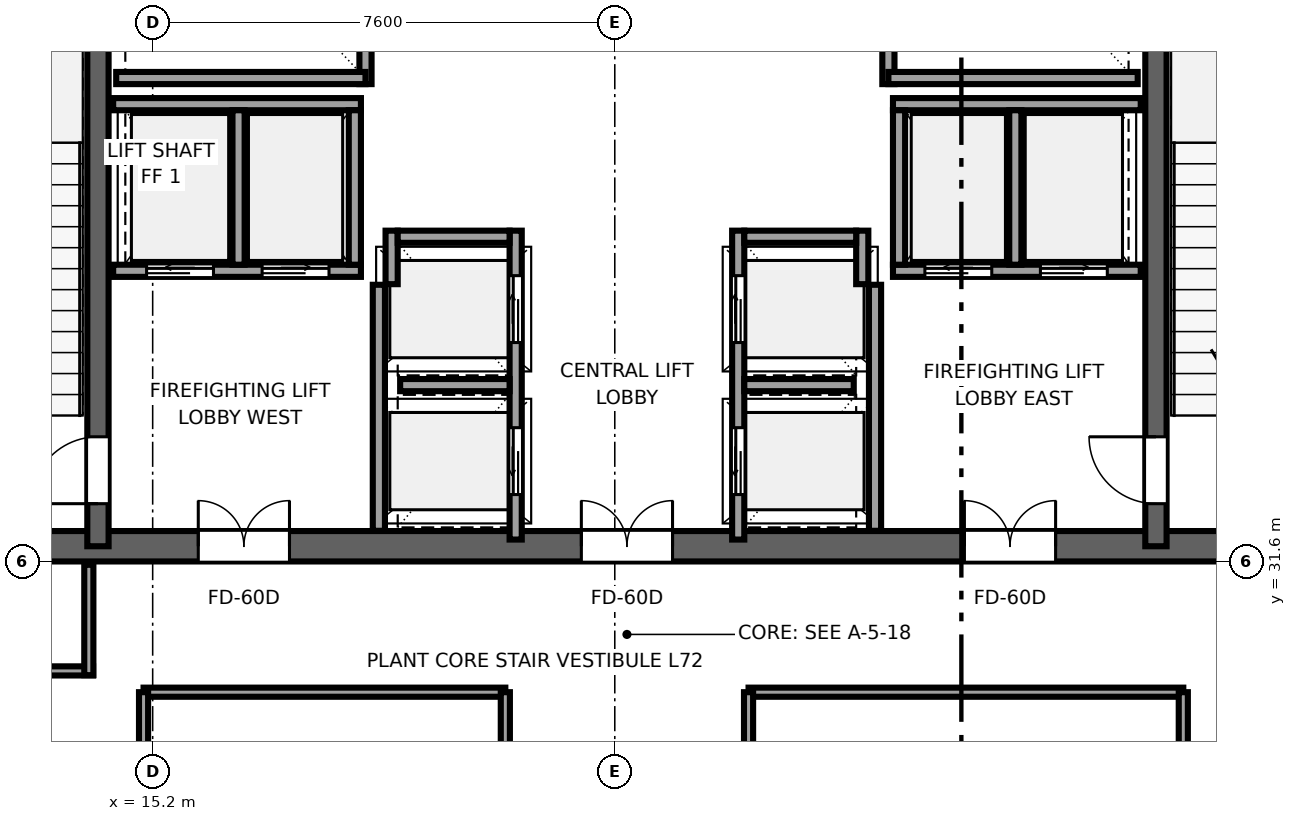
"""IFC4 building model, lengths in metres.
Left out: names, types, materials, properties, quantities, classifications, styles, units other than length and angle.
Written with IfcOpenShell. Run it as: python <this file> out.ifc"""

import sys

from ifc_helpers import new_model, si_unit, direction, frame, frame_2d, origin, place, context, subcontext, project, spatial, rectangle, extrude, source, transform, mapped, element, fill, save


model = new_model("IFC4")
c1 = context("Model", 3, precision=1e-05, world=origin(), true_north=direction((0.0, 1.0)))
c2 = subcontext(c1, "Body", "Model", "MODEL_VIEW")
j1 = project(units=[si_unit("LENGTHUNIT", "METRE"), si_unit("PLANEANGLEUNIT", "RADIAN")], contexts=[c1])
p1 = place(None, origin())
s1 = spatial("IfcSite", under=j1, at=p1, CompositionType="ELEMENT")
p2 = place(p1, origin())
s2 = spatial("IfcBuilding", under=s1, at=p2, CompositionType="ELEMENT")
p3 = place(p2, frame((0.0, 0.0, 270.05)))
s3 = spatial("IfcBuildingStorey", under=s2, at=p3, CompositionType="ELEMENT", Elevation=270.05)
p4 = place(p3, frame((10.0, 31.85, 0.0), z_axis=(0.0, 0.0, 1.0), x_axis=(1.0, 0.0, 0.0)))
e1 = element("IfcWall", 1, at=p4, inside=s3, PredefinedType="SHEAR", context=c2, shape_type="SweptSolid", body=[
    extrude(rectangle(XDim=26.0, YDim=0.5, at=frame_2d((13.0, 0.0))), origin(), (0.0, 0.0, 1.0), 5.0),
])
p5 = place(p4, frame((7.45, 0.0, 0.0), z_axis=(0.0, 0.0, 1.0), x_axis=(-1.0, 0.0, 0.0)))
e2 = element("IfcOpeningElement", 2, at=p5, cuts=e1, PredefinedType="OPENING", context=c2, shape_type="SweptSolid", body=[
    extrude(rectangle(XDim=1.5, YDim=2.04, at=frame_2d((0.75, 1.02))), frame((0.0, 0.26, 0.0), z_axis=(0.0, -1.0, 0.0), x_axis=(1.0, 0.0, 0.0)), (0.0, 0.0, 1.0), 0.52),
])
p6 = place(p4, frame((13.75, 0.0, 0.0), z_axis=(0.0, 0.0, 1.0), x_axis=(-1.0, 0.0, 0.0)))
e3 = element("IfcOpeningElement", 3, at=p6, cuts=e1, PredefinedType="OPENING", context=c2, shape_type="SweptSolid", body=[
    extrude(rectangle(XDim=1.5, YDim=2.04, at=frame_2d((0.75, 1.02))), frame((0.0, 0.26, 0.0), z_axis=(0.0, -1.0, 0.0), x_axis=(1.0, 0.0, 0.0)), (0.0, 0.0, 1.0), 0.52),
])
p7 = place(p4, frame((20.05, 0.0, 0.0), z_axis=(0.0, 0.0, 1.0), x_axis=(-1.0, 0.0, 0.0)))
e4 = element("IfcOpeningElement", 4, at=p7, cuts=e1, PredefinedType="OPENING", context=c2, shape_type="SweptSolid", body=[
    extrude(rectangle(XDim=1.5, YDim=2.04, at=frame_2d((0.75, 1.02))), frame((0.0, 0.26, 0.0), z_axis=(0.0, -1.0, 0.0), x_axis=(1.0, 0.0, 0.0)), (0.0, 0.0, 1.0), 0.52),
])
p8 = place(p3, frame((14.3, 31.85, 0.0), z_axis=(0.0, 0.0, 1.0), x_axis=(0.0, 1.0, 0.0)))
e5 = element("IfcWall", 5, at=p8, inside=s3, PredefinedType="SHEAR", context=c2, shape_type="SweptSolid", body=[
    extrude(rectangle(XDim=13.1, YDim=0.35, at=frame_2d((6.55, 0.0))), origin(), (0.0, 0.0, 1.0), 5.0),
])
p9 = place(p8, frame((0.7, 0.0, 0.0)))
e6 = element("IfcOpeningElement", 6, at=p9, cuts=e5, PredefinedType="OPENING", context=c2, shape_type="SweptSolid", body=[
    extrude(rectangle(XDim=1.1, YDim=2.12, at=frame_2d((0.55, 1.06))), frame((0.0, 0.185, 0.0), z_axis=(0.0, -1.0, 0.0), x_axis=(1.0, 0.0, 0.0)), (0.0, 0.0, 1.0), 0.37),
])
p10 = place(p3, frame((31.7, 31.85, 0.0), z_axis=(0.0, 0.0, 1.0), x_axis=(0.0, 1.0, 0.0)))
e7 = element("IfcWall", 7, at=p10, inside=s3, PredefinedType="SHEAR", context=c2, shape_type="SweptSolid", body=[
    extrude(rectangle(XDim=13.1, YDim=0.35, at=frame_2d((6.55, 0.0))), origin(), (0.0, 0.0, 1.0), 5.0),
])
p11 = place(p10, frame((1.8, 0.0, 0.0), z_axis=(0.0, 0.0, 1.0), x_axis=(-1.0, 0.0, 0.0)))
e8 = element("IfcOpeningElement", 8, at=p11, cuts=e7, PredefinedType="OPENING", context=c2, shape_type="SweptSolid", body=[
    extrude(rectangle(XDim=1.1, YDim=2.12, at=frame_2d((0.55, 1.06))), frame((0.0, 0.185, 0.0), z_axis=(0.0, -1.0, 0.0), x_axis=(1.0, 0.0, 0.0)), (0.0, 0.0, 1.0), 0.37),
])
p12 = place(p3, frame((18.7, 39.45, 0.0), z_axis=(0.0, 0.0, 1.0), x_axis=(0.0, 1.0, 0.0)))
e9 = element("IfcWall", 9, at=p12, inside=s3, PredefinedType="SOLIDWALL", context=c2, shape_type="SweptSolid", body=[
    extrude(rectangle(XDim=4.4, YDim=0.2, at=frame_2d((2.2, 0.0))), origin(), (0.0, 0.0, 1.0), 4.78),
])
p13 = place(p3, frame((14.6, 39.55, 0.0), z_axis=(0.0, 0.0, 1.0), x_axis=(1.0, 0.0, 0.0)))
e10 = element("IfcWall", 10, at=p13, inside=s3, PredefinedType="SOLIDWALL", context=c2, shape_type="SweptSolid", body=[
    extrude(rectangle(XDim=4.1, YDim=0.2, at=frame_2d((2.05, 0.0))), origin(), (0.0, 0.0, 1.0), 4.78),
])
p14 = place(p3, frame((27.3, 39.45, 0.0), z_axis=(0.0, 0.0, 1.0), x_axis=(0.0, 1.0, 0.0)))
e11 = element("IfcWall", 11, at=p14, inside=s3, PredefinedType="SOLIDWALL", context=c2, shape_type="SweptSolid", body=[
    extrude(rectangle(XDim=4.4, YDim=0.2, at=frame_2d((2.2, 0.0))), origin(), (0.0, 0.0, 1.0), 4.78),
])
p15 = place(p3, frame((27.3, 39.55, 0.0), z_axis=(0.0, 0.0, 1.0), x_axis=(1.0, 0.0, 0.0)))
e12 = element("IfcWall", 12, at=p15, inside=s3, PredefinedType="SOLIDWALL", context=c2, shape_type="SweptSolid", body=[
    extrude(rectangle(XDim=4.1, YDim=0.2, at=frame_2d((2.05, 0.0))), origin(), (0.0, 0.0, 1.0), 4.78),
])
for number, where, z_axis, x_axis in (
    (13, (18.92, 32.104, 0.0), (0.0, 0.0, 1.0), (0.0, 1.0, 0.0)),
    (14, (27.08, 32.104, 0.0), (0.0, 0.0, 1.0), (0.0, 1.0, 0.0)),
):
    element("IfcWall", number, at=place(p3, frame(where, z_axis=z_axis, x_axis=x_axis)), inside=s3, PredefinedType="SOLIDWALL", context=c2, shape_type="SweptSolid", body=[
        extrude(rectangle(XDim=4.046, YDim=0.2, at=frame_2d((2.023, 0.0))), origin(), (0.0, 0.0, 1.0), 4.78),
    ])
p16 = place(p3, frame((21.17, 31.96, 0.0), z_axis=(0.0, 0.0, 1.0), x_axis=(0.0, 1.0, 0.0)))
e15 = element("IfcWall", 15, at=p16, inside=s3, PredefinedType="SOLIDWALL", context=c2, shape_type="SweptSolid", body=[
    extrude(rectangle(XDim=5.08, YDim=0.2, at=frame_2d((2.54, 0.0))), origin(), (0.0, 0.0, 1.0), 4.78),
])
p17 = place(p16, frame((0.74, 0.0, 0.0)))
e16 = element("IfcOpeningElement", 16, at=p17, cuts=e15, PredefinedType="OPENING", context=c2, shape_type="SweptSolid", body=[
    extrude(rectangle(XDim=1.1, YDim=2.12, at=frame_2d((0.55, 1.06))), frame((0.0, 0.11, 0.0), z_axis=(0.0, -1.0, 0.0), x_axis=(1.0, 0.0, 0.0)), (0.0, 0.0, 1.0), 0.22),
])
p18 = place(p16, frame((3.24, 0.0, 0.0)))
e17 = element("IfcOpeningElement", 17, at=p18, cuts=e15, PredefinedType="OPENING", context=c2, shape_type="SweptSolid", body=[
    extrude(rectangle(XDim=1.1, YDim=2.12, at=frame_2d((0.55, 1.06))), frame((0.0, 0.11, 0.0), z_axis=(0.0, -1.0, 0.0), x_axis=(1.0, 0.0, 0.0)), (0.0, 0.0, 1.0), 0.22),
])
p19 = place(p3, frame((19.13, 36.16, 0.0), z_axis=(0.0, 0.0, 1.0), x_axis=(0.0, 1.0, 0.0)))
e18 = element("IfcWall", 18, at=p19, inside=s3, PredefinedType="SOLIDWALL", context=c2, shape_type="SweptSolid", body=[
    extrude(rectangle(XDim=0.88, YDim=0.2, at=frame_2d((0.44, 0.0))), origin(), (0.0, 0.0, 1.0), 4.78),
])
p20 = place(p3, frame((19.23, 36.94, 0.0), z_axis=(0.0, 0.0, 1.0), x_axis=(1.0, 0.0, 0.0)))
e19 = element("IfcWall", 19, at=p20, inside=s3, PredefinedType="SOLIDWALL", context=c2, shape_type="SweptSolid", body=[
    extrude(rectangle(XDim=1.84, YDim=0.2, at=frame_2d((0.92, 0.0))), origin(), (0.0, 0.0, 1.0), 4.78),
])
p21 = place(p3, frame((19.27, 34.5, 0.0), z_axis=(0.0, 0.0, 1.0), x_axis=(1.0, 0.0, 0.0)))
e20 = element("IfcWall", 20, at=p21, inside=s3, PredefinedType="SOLIDWALL", context=c2, shape_type="SweptSolid", body=[
    extrude(rectangle(XDim=1.8, YDim=0.2, at=frame_2d((0.9, 0.0))), origin(), (0.0, 0.0, 1.0), 4.78),
])
p22 = place(p3, frame((27.375, 36.38, 0.0), z_axis=(0.0, 0.0, 1.0), x_axis=(1.0, 0.0, 0.0)))
e21 = element("IfcWall", 21, at=p22, inside=s3, PredefinedType="SOLIDWALL", context=c2, shape_type="SweptSolid", body=[
    extrude(rectangle(XDim=4.075, YDim=0.2, at=frame_2d((2.038, 0.0))), origin(), (0.0, 0.0, 1.0), 4.78),
])
p23 = place(p22, frame((0.525, 0.0, 0.0)))
e22 = element("IfcOpeningElement", 22, at=p23, cuts=e21, PredefinedType="OPENING", context=c2, shape_type="SweptSolid", body=[
    extrude(rectangle(XDim=1.1, YDim=2.12, at=frame_2d((0.55, 1.06))), frame((0.0, 0.11, 0.0), z_axis=(0.0, -1.0, 0.0), x_axis=(1.0, 0.0, 0.0)), (0.0, 0.0, 1.0), 0.22),
])
p24 = place(p22, frame((2.425, 0.0, 0.0)))
e23 = element("IfcOpeningElement", 23, at=p24, cuts=e21, PredefinedType="OPENING", context=c2, shape_type="SweptSolid", body=[
    extrude(rectangle(XDim=1.1, YDim=2.12, at=frame_2d((0.55, 1.06))), frame((0.0, 0.11, 0.0), z_axis=(0.0, -1.0, 0.0), x_axis=(1.0, 0.0, 0.0)), (0.0, 0.0, 1.0), 0.22),
])
p25 = place(p3, frame((27.375, 39.12, 0.0), z_axis=(0.0, 0.0, 1.0), x_axis=(1.0, 0.0, 0.0)))
e24 = element("IfcWall", 24, at=p25, inside=s3, PredefinedType="SOLIDWALL", context=c2, shape_type="SweptSolid", body=[
    extrude(rectangle(XDim=4.075, YDim=0.2, at=frame_2d((2.038, 0.0))), origin(), (0.0, 0.0, 1.0), 4.78),
])
for number, where, z_axis, x_axis in (
    (25, (27.475, 36.48, 0.0), (0.0, 0.0, 1.0), (0.0, 1.0, 0.0)),
    (26, (29.387, 36.48, 0.0), (0.0, 0.0, 1.0), (0.0, 1.0, 0.0)),
):
    element("IfcWall", number, at=place(p3, frame(where, z_axis=z_axis, x_axis=x_axis)), inside=s3, PredefinedType="SOLIDWALL", context=c2, shape_type="SweptSolid", body=[
        extrude(rectangle(XDim=2.54, YDim=0.2, at=frame_2d((1.27, 0.0))), origin(), (0.0, 0.0, 1.0), 4.78),
    ])
p26 = place(p3, frame((14.55, 36.38, 0.0), z_axis=(0.0, 0.0, 1.0), x_axis=(1.0, 0.0, 0.0)))
e27 = element("IfcWall", 27, at=p26, inside=s3, PredefinedType="SOLIDWALL", context=c2, shape_type="SweptSolid", body=[
    extrude(rectangle(XDim=4.075, YDim=0.2, at=frame_2d((2.038, 0.0))), origin(), (0.0, 0.0, 1.0), 4.78),
])
p27 = place(p26, frame((0.55, 0.0, 0.0)))
e28 = element("IfcOpeningElement", 28, at=p27, cuts=e27, PredefinedType="OPENING", context=c2, shape_type="SweptSolid", body=[
    extrude(rectangle(XDim=1.1, YDim=2.12, at=frame_2d((0.55, 1.06))), frame((0.0, 0.11, 0.0), z_axis=(0.0, -1.0, 0.0), x_axis=(1.0, 0.0, 0.0)), (0.0, 0.0, 1.0), 0.22),
])
p28 = place(p26, frame((2.45, 0.0, 0.0)))
e29 = element("IfcOpeningElement", 29, at=p28, cuts=e27, PredefinedType="OPENING", context=c2, shape_type="SweptSolid", body=[
    extrude(rectangle(XDim=1.1, YDim=2.12, at=frame_2d((0.55, 1.06))), frame((0.0, 0.11, 0.0), z_axis=(0.0, -1.0, 0.0), x_axis=(1.0, 0.0, 0.0)), (0.0, 0.0, 1.0), 0.22),
])
p29 = place(p3, frame((14.55, 39.12, 0.0), z_axis=(0.0, 0.0, 1.0), x_axis=(1.0, 0.0, 0.0)))
e30 = element("IfcWall", 30, at=p29, inside=s3, PredefinedType="SOLIDWALL", context=c2, shape_type="SweptSolid", body=[
    extrude(rectangle(XDim=4.075, YDim=0.2, at=frame_2d((2.038, 0.0))), origin(), (0.0, 0.0, 1.0), 4.78),
])
for number, where, z_axis, x_axis in (
    (31, (18.525, 36.48, 0.0), (0.0, 0.0, 1.0), (0.0, 1.0, 0.0)),
    (32, (16.613, 36.48, 0.0), (0.0, 0.0, 1.0), (0.0, 1.0, 0.0)),
):
    element("IfcWall", number, at=place(p3, frame(where, z_axis=z_axis, x_axis=x_axis)), inside=s3, PredefinedType="SOLIDWALL", context=c2, shape_type="SweptSolid", body=[
        extrude(rectangle(XDim=2.54, YDim=0.2, at=frame_2d((1.27, 0.0))), origin(), (0.0, 0.0, 1.0), 4.78),
    ])
p30 = place(p3, frame((24.83, 31.96, 0.0), z_axis=(0.0, 0.0, 1.0), x_axis=(0.0, 1.0, 0.0)))
e33 = element("IfcWall", 33, at=p30, inside=s3, PredefinedType="SOLIDWALL", context=c2, shape_type="SweptSolid", body=[
    extrude(rectangle(XDim=5.08, YDim=0.2, at=frame_2d((2.54, 0.0))), origin(), (0.0, 0.0, 1.0), 4.78),
])
p31 = place(p30, frame((0.74, 0.0, 0.0)))
e34 = element("IfcOpeningElement", 34, at=p31, cuts=e33, PredefinedType="OPENING", context=c2, shape_type="SweptSolid", body=[
    extrude(rectangle(XDim=1.1, YDim=2.12, at=frame_2d((0.55, 1.06))), frame((0.0, 0.11, 0.0), z_axis=(0.0, -1.0, 0.0), x_axis=(1.0, 0.0, 0.0)), (0.0, 0.0, 1.0), 0.22),
])
p32 = place(p30, frame((3.24, 0.0, 0.0)))
e35 = element("IfcOpeningElement", 35, at=p32, cuts=e33, PredefinedType="OPENING", context=c2, shape_type="SweptSolid", body=[
    extrude(rectangle(XDim=1.1, YDim=2.12, at=frame_2d((0.55, 1.06))), frame((0.0, 0.11, 0.0), z_axis=(0.0, -1.0, 0.0), x_axis=(1.0, 0.0, 0.0)), (0.0, 0.0, 1.0), 0.22),
])
p33 = place(p3, frame((26.87, 36.16, 0.0), z_axis=(0.0, 0.0, 1.0), x_axis=(0.0, 1.0, 0.0)))
e36 = element("IfcWall", 36, at=p33, inside=s3, PredefinedType="SOLIDWALL", context=c2, shape_type="SweptSolid", body=[
    extrude(rectangle(XDim=0.88, YDim=0.2, at=frame_2d((0.44, 0.0))), origin(), (0.0, 0.0, 1.0), 4.78),
])
p34 = place(p3, frame((24.93, 36.94, 0.0), z_axis=(0.0, 0.0, 1.0), x_axis=(1.0, 0.0, 0.0)))
e37 = element("IfcWall", 37, at=p34, inside=s3, PredefinedType="SOLIDWALL", context=c2, shape_type="SweptSolid", body=[
    extrude(rectangle(XDim=1.84, YDim=0.2, at=frame_2d((0.92, 0.0))), origin(), (0.0, 0.0, 1.0), 4.78),
])
p35 = place(p3, frame((24.93, 34.5, 0.0), z_axis=(0.0, 0.0, 1.0), x_axis=(1.0, 0.0, 0.0)))
e38 = element("IfcWall", 38, at=p35, inside=s3, PredefinedType="SOLIDWALL", context=c2, shape_type="SweptSolid", body=[
    extrude(rectangle(XDim=1.8, YDim=0.2, at=frame_2d((0.9, 0.0))), origin(), (0.0, 0.0, 1.0), 4.78),
])
p36 = place(p3, frame((15.05, 29.45, 0.0), z_axis=(0.0, 0.0, 1.0), x_axis=(1.0, 0.0, 0.0)))
e39 = element("IfcWall", 39, at=p36, inside=s3, PredefinedType="PARTITIONING", context=c2, shape_type="SweptSolid", body=[
    extrude(rectangle(XDim=5.95, YDim=0.15, at=frame_2d((2.975, 0.0))), origin(), (0.0, 0.0, 1.0), 4.78),
])
for number, where, z_axis, x_axis in (
    (40, (15.05, 24.05, 0.0), (0.0, 0.0, 1.0), (0.0, 1.0, 0.0)),
    (41, (21.0, 24.05, 0.0), (0.0, 0.0, 1.0), (0.0, 1.0, 0.0)),
):
    element("IfcWall", number, at=place(p3, frame(where, z_axis=z_axis, x_axis=x_axis)), inside=s3, PredefinedType="PARTITIONING", context=c2, shape_type="SweptSolid", body=[
        extrude(rectangle(XDim=5.4, YDim=0.15, at=frame_2d((2.7, 0.0))), origin(), (0.0, 0.0, 1.0), 4.78),
    ])
p37 = place(p3, frame((25.0, 29.45, 0.0), z_axis=(0.0, 0.0, 1.0), x_axis=(1.0, 0.0, 0.0)))
e42 = element("IfcWall", 42, at=p37, inside=s3, PredefinedType="PARTITIONING", context=c2, shape_type="SweptSolid", body=[
    extrude(rectangle(XDim=7.15, YDim=0.15, at=frame_2d((3.575, 0.0))), origin(), (0.0, 0.0, 1.0), 4.78),
])
for number, where, z_axis, x_axis in (
    (43, (25.0, 24.05, 0.0), (0.0, 0.0, 1.0), (0.0, 1.0, 0.0)),
    (44, (32.15, 24.05, 0.0), (0.0, 0.0, 1.0), (0.0, 1.0, 0.0)),
):
    element("IfcWall", number, at=place(p3, frame(where, z_axis=z_axis, x_axis=x_axis)), inside=s3, PredefinedType="PARTITIONING", context=c2, shape_type="SweptSolid", body=[
        extrude(rectangle(XDim=5.4, YDim=0.15, at=frame_2d((2.7, 0.0))), origin(), (0.0, 0.0, 1.0), 4.78),
    ])
p38 = place(p3, frame((9.83, 29.8, 0.0), z_axis=(0.0, 0.0, 1.0), x_axis=(1.0, 0.0, 0.0)))
e45 = element("IfcWall", 45, at=p38, inside=s3, PredefinedType="PARTITIONING", context=c2, shape_type="SweptSolid", body=[
    extrude(rectangle(XDim=4.39, YDim=0.15, at=frame_2d((2.195, 0.0))), origin(), (0.0, 0.0, 1.0), 4.78),
])
p39 = place(p3, frame((14.15, 29.73, 0.0), z_axis=(0.0, 0.0, 1.0), x_axis=(0.0, 1.0, 0.0)))
e46 = element("IfcWall", 46, at=p39, inside=s3, PredefinedType="PARTITIONING", context=c2, shape_type="SweptSolid", body=[
    extrude(rectangle(XDim=1.815, YDim=0.15, at=frame_2d((0.907, 0.0))), origin(), (0.0, 0.0, 1.0), 3.57),
])
m1 = source(origin(), c2, "Body", "SweptSolid", [
    extrude(rectangle(XDim=1.1, YDim=2.12, at=frame_2d((0.55, 1.06))), frame((0.0, 0.025, 0.0), z_axis=(0.0, -1.0, 0.0), x_axis=(1.0, 0.0, 0.0)), (0.0, 0.0, 1.0), 0.05),
])
p40 = place(p9, origin())
e47 = element("IfcDoor", 47, at=p40, inside=s3, OperationType="SINGLE_SWING_LEFT", PredefinedType="DOOR", context=c2, shape_type="MappedRepresentation", body=[
    mapped(m1, transform((0.0, 0.0, 0.0), x_axis=(1.0, 0.0, 0.0), y_axis=(0.0, 1.0, 0.0), z_axis=(0.0, 0.0, 1.0), scale=1.0)),
])
fill(e6, e47)
p41 = place(p11, origin())
e48 = element("IfcDoor", 48, at=p41, inside=s3, OperationType="SINGLE_SWING_RIGHT", PredefinedType="DOOR", context=c2, shape_type="MappedRepresentation", body=[
    mapped(m1, transform((0.0, 0.0, 0.0), x_axis=(1.0, 0.0, 0.0), y_axis=(0.0, 1.0, 0.0), z_axis=(0.0, 0.0, 1.0), scale=1.0)),
])
fill(e8, e48)
m2 = source(origin(), c2, "Body", "SweptSolid", [
    extrude(rectangle(XDim=1.5, YDim=2.04, at=frame_2d((0.75, 1.02))), frame((0.0, 0.025, 0.0), z_axis=(0.0, -1.0, 0.0), x_axis=(1.0, 0.0, 0.0)), (0.0, 0.0, 1.0), 0.05),
])
p42 = place(p5, origin())
e49 = element("IfcDoor", 49, at=p42, inside=s3, OperationType="DOUBLE_DOOR_SINGLE_SWING", PredefinedType="DOOR", context=c2, shape_type="MappedRepresentation", body=[
    mapped(m2, transform((0.0, 0.0, 0.0), x_axis=(1.0, 0.0, 0.0), y_axis=(0.0, 1.0, 0.0), z_axis=(0.0, 0.0, 1.0), scale=1.0)),
])
fill(e2, e49)
p43 = place(p6, origin())
e50 = element("IfcDoor", 50, at=p43, inside=s3, OperationType="DOUBLE_DOOR_SINGLE_SWING", PredefinedType="DOOR", context=c2, shape_type="MappedRepresentation", body=[
    mapped(m2, transform((0.0, 0.0, 0.0), x_axis=(1.0, 0.0, 0.0), y_axis=(0.0, 1.0, 0.0), z_axis=(0.0, 0.0, 1.0), scale=1.0)),
])
fill(e3, e50)
p44 = place(p7, origin())
e51 = element("IfcDoor", 51, at=p44, inside=s3, OperationType="DOUBLE_DOOR_SINGLE_SWING", PredefinedType="DOOR", context=c2, shape_type="MappedRepresentation", body=[
    mapped(m2, transform((0.0, 0.0, 0.0), x_axis=(1.0, 0.0, 0.0), y_axis=(0.0, 1.0, 0.0), z_axis=(0.0, 0.0, 1.0), scale=1.0)),
])
fill(e4, e51)
m3 = source(origin(), c2, "Body", "SweptSolid", [
    extrude(rectangle(XDim=1.1, YDim=2.12, at=frame_2d((0.55, 1.06))), frame((0.0, 0.025, 0.0), z_axis=(0.0, -1.0, 0.0), x_axis=(1.0, 0.0, 0.0)), (0.0, 0.0, 1.0), 0.05),
])
p45 = place(p17, origin())
e52 = element("IfcDoor", 52, at=p45, inside=s3, OperationType="SLIDING_TO_LEFT", PredefinedType="DOOR", context=c2, shape_type="MappedRepresentation", body=[
    mapped(m3, transform((0.0, 0.0, 0.0), x_axis=(1.0, 0.0, 0.0), y_axis=(0.0, 1.0, 0.0), z_axis=(0.0, 0.0, 1.0), scale=1.0)),
])
fill(e16, e52)
p46 = place(p18, origin())
e53 = element("IfcDoor", 53, at=p46, inside=s3, OperationType="SLIDING_TO_RIGHT", PredefinedType="DOOR", context=c2, shape_type="MappedRepresentation", body=[
    mapped(m3, transform((0.0, 0.0, 0.0), x_axis=(1.0, 0.0, 0.0), y_axis=(0.0, 1.0, 0.0), z_axis=(0.0, 0.0, 1.0), scale=1.0)),
])
fill(e17, e53)
p47 = place(p23, origin())
e54 = element("IfcDoor", 54, at=p47, inside=s3, OperationType="SLIDING_TO_LEFT", PredefinedType="DOOR", context=c2, shape_type="MappedRepresentation", body=[
    mapped(m3, transform((0.0, 0.0, 0.0), x_axis=(1.0, 0.0, 0.0), y_axis=(0.0, 1.0, 0.0), z_axis=(0.0, 0.0, 1.0), scale=1.0)),
])
fill(e22, e54)
p48 = place(p24, origin())
e55 = element("IfcDoor", 55, at=p48, inside=s3, OperationType="SLIDING_TO_RIGHT", PredefinedType="DOOR", context=c2, shape_type="MappedRepresentation", body=[
    mapped(m3, transform((0.0, 0.0, 0.0), x_axis=(1.0, 0.0, 0.0), y_axis=(0.0, 1.0, 0.0), z_axis=(0.0, 0.0, 1.0), scale=1.0)),
])
fill(e23, e55)
p49 = place(p27, origin())
e56 = element("IfcDoor", 56, at=p49, inside=s3, OperationType="SLIDING_TO_LEFT", PredefinedType="DOOR", context=c2, shape_type="MappedRepresentation", body=[
    mapped(m3, transform((0.0, 0.0, 0.0), x_axis=(1.0, 0.0, 0.0), y_axis=(0.0, 1.0, 0.0), z_axis=(0.0, 0.0, 1.0), scale=1.0)),
])
fill(e28, e56)
p50 = place(p28, origin())
e57 = element("IfcDoor", 57, at=p50, inside=s3, OperationType="SLIDING_TO_RIGHT", PredefinedType="DOOR", context=c2, shape_type="MappedRepresentation", body=[
    mapped(m3, transform((0.0, 0.0, 0.0), x_axis=(1.0, 0.0, 0.0), y_axis=(0.0, 1.0, 0.0), z_axis=(0.0, 0.0, 1.0), scale=1.0)),
])
fill(e29, e57)
p51 = place(p31, origin())
e58 = element("IfcDoor", 58, at=p51, inside=s3, OperationType="SLIDING_TO_LEFT", PredefinedType="DOOR", context=c2, shape_type="MappedRepresentation", body=[
    mapped(m3, transform((0.0, 0.0, 0.0), x_axis=(1.0, 0.0, 0.0), y_axis=(0.0, 1.0, 0.0), z_axis=(0.0, 0.0, 1.0), scale=1.0)),
])
fill(e34, e58)
p52 = place(p32, origin())
e59 = element("IfcDoor", 59, at=p52, inside=s3, OperationType="SLIDING_TO_RIGHT", PredefinedType="DOOR", context=c2, shape_type="MappedRepresentation", body=[
    mapped(m3, transform((0.0, 0.0, 0.0), x_axis=(1.0, 0.0, 0.0), y_axis=(0.0, 1.0, 0.0), z_axis=(0.0, 0.0, 1.0), scale=1.0)),
])
fill(e35, e59)
save(model, sys.argv[1])
